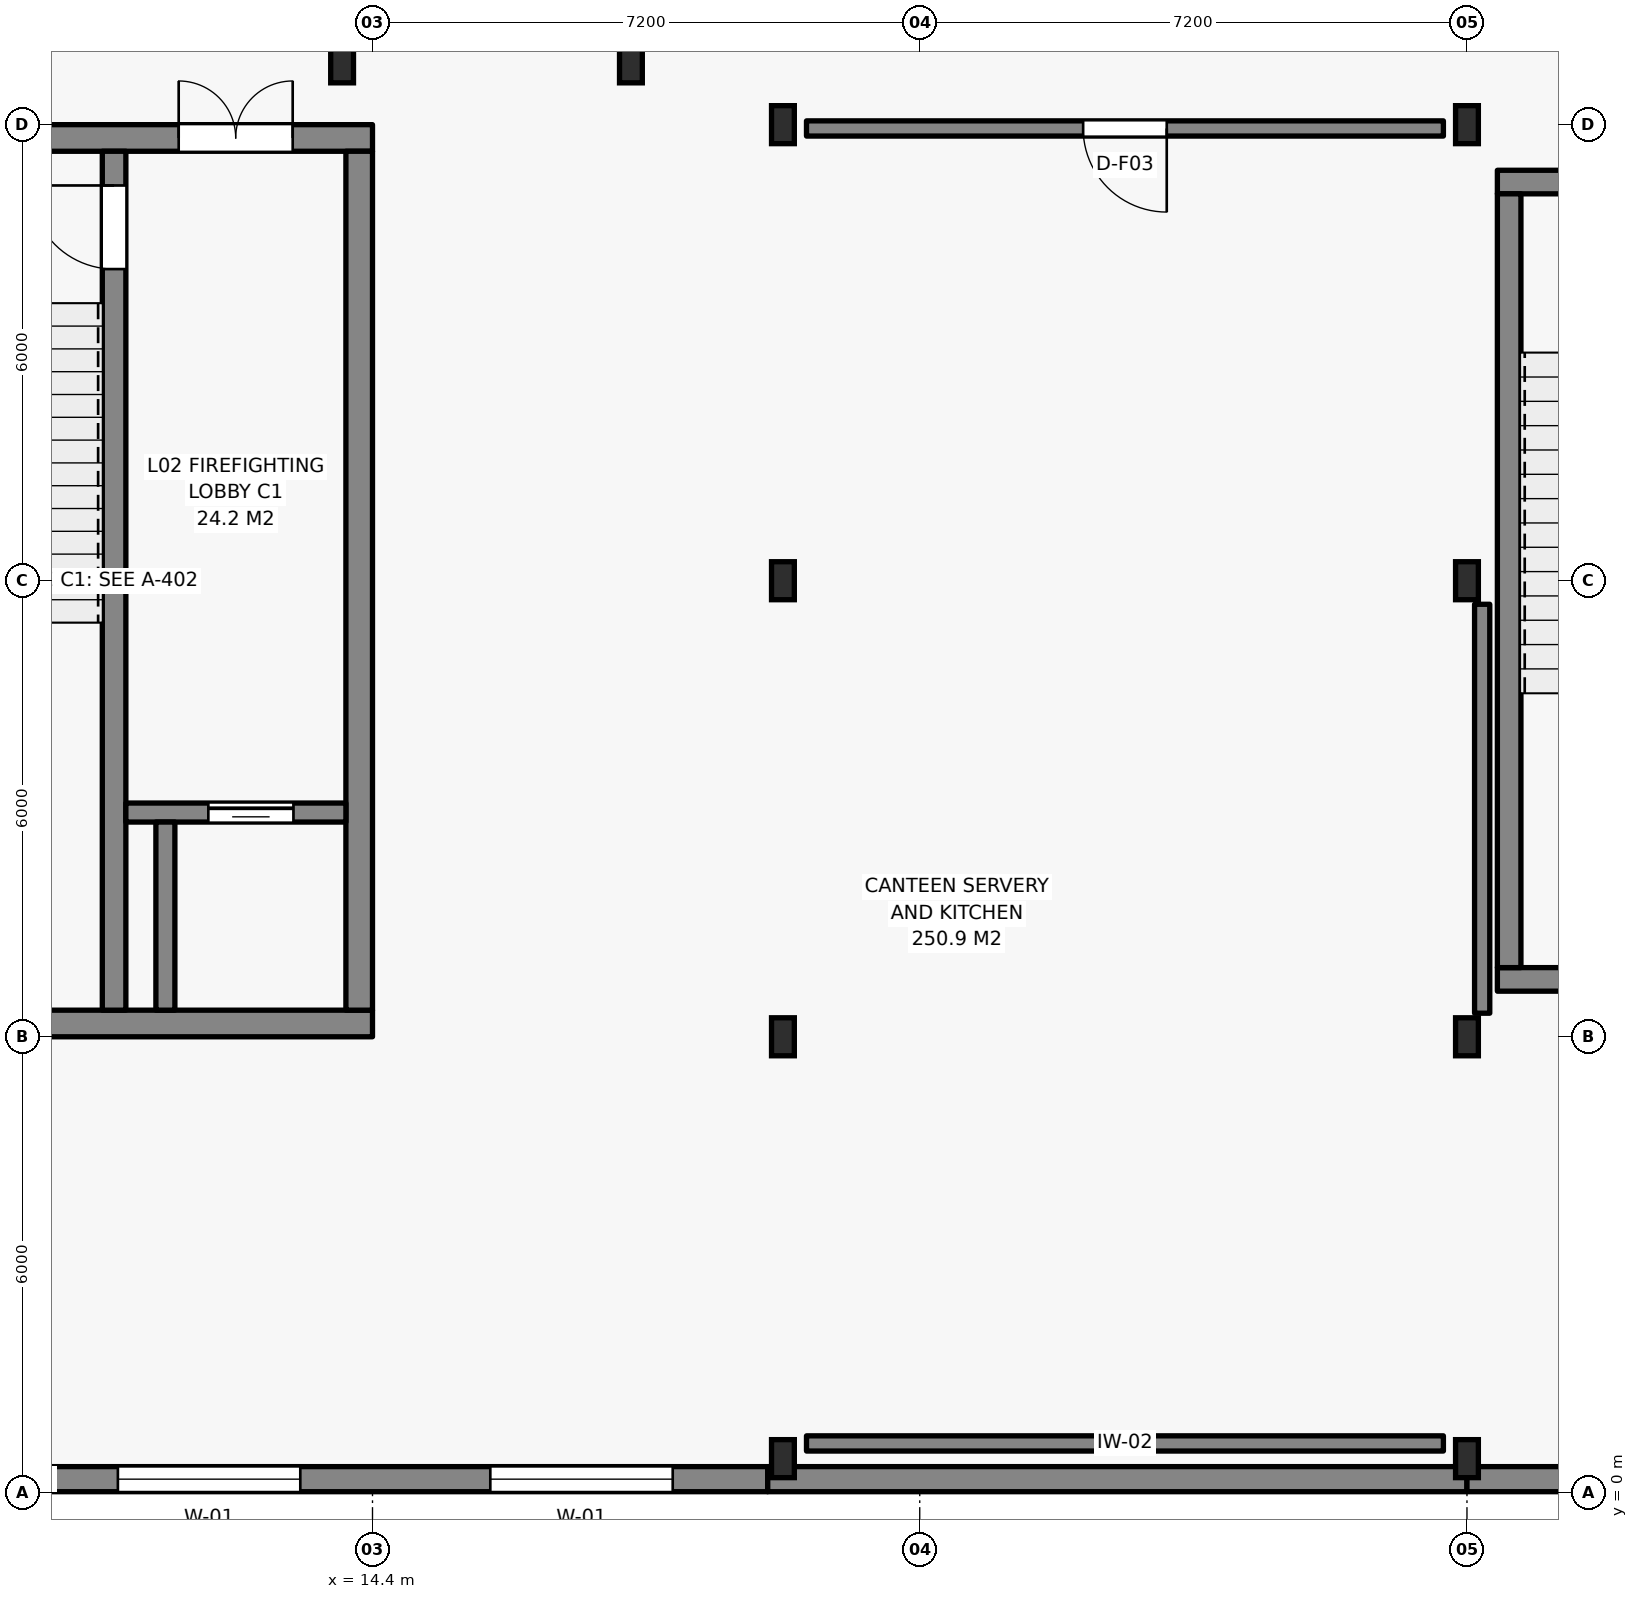
"""IFC4 building model, lengths in metres.
Left out: names, types, materials, properties, quantities, classifications, styles, units other than length and angle.
Written with IfcOpenShell. Run it as: python <this file> out.ifc"""

import sys

from ifc_helpers import new_model, si_unit, direction, frame, frame_2d, origin, origin_2d, place, context, subcontext, project, spatial, rectangle, i_section, extrude, element, fill, save


model = new_model("IFC4")
c1 = context("Model", 3, precision=1e-05, world=origin(), true_north=direction((0.0, 1.0)))
c2 = subcontext(c1, "Body", "Model", "MODEL_VIEW")
j1 = project(units=[si_unit("LENGTHUNIT", "METRE"), si_unit("PLANEANGLEUNIT", "RADIAN")], contexts=[c1])
p1 = place(None, origin())
s1 = spatial("IfcSite", under=j1, at=p1, CompositionType="ELEMENT")
p2 = place(p1, origin())
s2 = spatial("IfcBuilding", under=s1, at=p2, CompositionType="ELEMENT")
p3 = place(p2, frame((0.0, 0.0, 6.0)))
s3 = spatial("IfcBuildingStorey", under=s2, at=p3, CompositionType="ELEMENT", Elevation=6.0)
p4 = place(p3, frame((7.2, 6.175, 0.0), z_axis=(0.0, 0.0, 1.0), x_axis=(1.0, 0.0, 0.0)))
e1 = element("IfcWall", 1, at=p4, inside=s3, PredefinedType="SHEAR", context=c2, shape_type="SweptSolid", body=[
    extrude(rectangle(XDim=7.2, YDim=0.35, at=frame_2d((3.6, 0.0))), origin(), (0.0, 0.0, 1.0), 4.25),
])
p5 = place(p3, frame((7.2, 17.825, 0.0), z_axis=(0.0, 0.0, 1.0), x_axis=(1.0, 0.0, 0.0)))
e2 = element("IfcWall", 2, at=p5, inside=s3, PredefinedType="SHEAR", context=c2, shape_type="SweptSolid", body=[
    extrude(rectangle(XDim=7.2, YDim=0.35, at=frame_2d((3.6, 0.0))), origin(), (0.0, 0.0, 1.0), 4.25),
])
p6 = place(p5, frame((4.65, 0.0, 0.0)))
e3 = element("IfcOpeningElement", 3, at=p6, cuts=e2, PredefinedType="OPENING", context=c2, shape_type="SweptSolid", body=[
    extrude(rectangle(XDim=1.5, YDim=2.15, at=frame_2d((0.75, 1.075))), frame((0.0, 0.185, 0.0), z_axis=(0.0, -1.0, 0.0), x_axis=(1.0, 0.0, 0.0)), (0.0, 0.0, 1.0), 0.37),
])
p7 = place(p3, frame((14.225, 6.35, 0.0), z_axis=(0.0, 0.0, 1.0), x_axis=(0.0, 1.0, 0.0)))
e4 = element("IfcWall", 4, at=p7, inside=s3, PredefinedType="SHEAR", context=c2, shape_type="SweptSolid", body=[
    extrude(rectangle(XDim=11.3, YDim=0.35, at=frame_2d((5.65, 0.0))), origin(), (0.0, 0.0, 1.0), 4.25),
])
p8 = place(p3, frame((11.0, 6.35, 0.0), z_axis=(0.0, 0.0, 1.0), x_axis=(0.0, 1.0, 0.0)))
e5 = element("IfcWall", 5, at=p8, inside=s3, PredefinedType="SHEAR", context=c2, shape_type="SweptSolid", body=[
    extrude(rectangle(XDim=11.3, YDim=0.31, at=frame_2d((5.65, 0.0))), origin(), (0.0, 0.0, 1.0), 4.25),
])
p9 = place(p8, frame((9.75, 0.0, 0.0)))
e6 = element("IfcOpeningElement", 6, at=p9, cuts=e5, PredefinedType="OPENING", context=c2, shape_type="SweptSolid", body=[
    extrude(rectangle(XDim=1.1, YDim=2.15, at=frame_2d((0.55, 1.075))), frame((0.0, 0.165, 0.0), z_axis=(0.0, -1.0, 0.0), x_axis=(1.0, 0.0, 0.0)), (0.0, 0.0, 1.0), 0.33),
])
p10 = place(p3, frame((29.2, 6.755, 0.0), z_axis=(0.0, 0.0, 1.0), x_axis=(1.0, 0.0, 0.0)))
e7 = element("IfcWall", 7, at=p10, inside=s3, PredefinedType="SHEAR", context=c2, shape_type="SweptSolid", body=[
    extrude(rectangle(XDim=4.8, YDim=0.31, at=frame_2d((2.4, 0.0))), origin(), (0.0, 0.0, 1.0), 4.25),
])
p11 = place(p3, frame((29.2, 17.245, 0.0), z_axis=(0.0, 0.0, 1.0), x_axis=(1.0, 0.0, 0.0)))
e8 = element("IfcWall", 8, at=p11, inside=s3, PredefinedType="SHEAR", context=c2, shape_type="SweptSolid", body=[
    extrude(rectangle(XDim=4.8, YDim=0.31, at=frame_2d((2.4, 0.0))), origin(), (0.0, 0.0, 1.0), 4.25),
])
p12 = place(p11, frame((1.5, 0.0, 0.0)))
e9 = element("IfcOpeningElement", 9, at=p12, cuts=e8, PredefinedType="OPENING", context=c2, shape_type="SweptSolid", body=[
    extrude(rectangle(XDim=1.8, YDim=2.15, at=frame_2d((0.9, 1.075))), frame((0.0, 0.165, 0.0), z_axis=(0.0, -1.0, 0.0), x_axis=(1.0, 0.0, 0.0)), (0.0, 0.0, 1.0), 0.33),
])
p13 = place(p3, frame((29.355, 6.91, 0.0), z_axis=(0.0, 0.0, 1.0), x_axis=(0.0, 1.0, 0.0)))
e10 = element("IfcWall", 10, at=p13, inside=s3, PredefinedType="SHEAR", context=c2, shape_type="SweptSolid", body=[
    extrude(rectangle(XDim=10.18, YDim=0.31, at=frame_2d((5.09, 0.0))), origin(), (0.0, 0.0, 1.0), 4.25),
])
for number, where, z_axis, x_axis in (
    (11, (19.8, 0.45, 0.0), (0.0, 0.0, 1.0), (1.0, 0.0, 0.0)),
    (12, (19.8, 6.0, 0.0), (0.0, 0.0, 1.0), (1.0, 0.0, 0.0)),
    (13, (19.8, 12.0, 0.0), (0.0, 0.0, 1.0), (1.0, 0.0, 0.0)),
    (14, (19.8, 18.0, 0.0), (0.0, 0.0, 1.0), (1.0, 0.0, 0.0)),
    (15, (28.8, 0.45, 0.0), (0.0, 0.0, 1.0), (1.0, 0.0, 0.0)),
    (16, (28.8, 6.0, 0.0), (0.0, 0.0, 1.0), (1.0, 0.0, 0.0)),
    (17, (28.8, 12.0, 0.0), (0.0, 0.0, 1.0), (1.0, 0.0, 0.0)),
    (18, (28.8, 18.0, 0.0), (0.0, 0.0, 1.0), (1.0, 0.0, 0.0)),
    (19, (14.0, 18.8, 0.0), (0.0, 0.0, 1.0), (1.0, 0.0, 0.0)),
    (20, (17.8, 18.8, 0.0), (0.0, 0.0, 1.0), (1.0, 0.0, 0.0)),
):
    element("IfcColumn", number, at=place(p3, frame(where, z_axis=z_axis, x_axis=x_axis)), inside=s3, PredefinedType="COLUMN", context=c2, shape_type="SweptSolid", body=[
        extrude(i_section(OverallWidth=0.3, OverallDepth=0.5, WebThickness=0.014, FlangeThickness=0.028, FilletRadius=0.027, at=origin_2d()), origin(), (0.0, 0.0, 1.0), 4.5),
    ])
p14 = place(p3, frame((0.0, 0.18, 0.0), z_axis=(0.0, 0.0, 1.0), x_axis=(1.0, 0.0, 0.0)))
e21 = element("IfcWall", 21, at=p14, inside=s3, PredefinedType="SOLIDWALL", context=c2, shape_type="SweptSolid", body=[
    extrude(rectangle(XDim=19.6, YDim=0.33, at=frame_2d((9.8, 0.0))), origin(), (0.0, 0.0, 1.0), 3.985),
])
p15 = place(p14, frame((1.25, 0.0, 0.82)))
e22 = element("IfcOpeningElement", 22, at=p15, cuts=e21, PredefinedType="OPENING", context=c2, shape_type="SweptSolid", body=[
    extrude(rectangle(XDim=2.4, YDim=2.55, at=frame_2d((1.2, 1.275))), frame((0.0, 0.175, 0.0), z_axis=(0.0, -1.0, 0.0), x_axis=(1.0, 0.0, 0.0)), (0.0, 0.0, 1.0), 0.35),
])
p16 = place(p14, frame((6.15, 0.0, 0.82)))
e23 = element("IfcOpeningElement", 23, at=p16, cuts=e21, PredefinedType="OPENING", context=c2, shape_type="SweptSolid", body=[
    extrude(rectangle(XDim=2.4, YDim=2.55, at=frame_2d((1.2, 1.275))), frame((0.0, 0.175, 0.0), z_axis=(0.0, -1.0, 0.0), x_axis=(1.0, 0.0, 0.0)), (0.0, 0.0, 1.0), 0.35),
])
p17 = place(p14, frame((11.05, 0.0, 0.82)))
e24 = element("IfcOpeningElement", 24, at=p17, cuts=e21, PredefinedType="OPENING", context=c2, shape_type="SweptSolid", body=[
    extrude(rectangle(XDim=2.4, YDim=2.55, at=frame_2d((1.2, 1.275))), frame((0.0, 0.175, 0.0), z_axis=(0.0, -1.0, 0.0), x_axis=(1.0, 0.0, 0.0)), (0.0, 0.0, 1.0), 0.35),
])
p18 = place(p14, frame((15.95, 0.0, 0.82)))
e25 = element("IfcOpeningElement", 25, at=p18, cuts=e21, PredefinedType="OPENING", context=c2, shape_type="SweptSolid", body=[
    extrude(rectangle(XDim=2.4, YDim=2.55, at=frame_2d((1.2, 1.275))), frame((0.0, 0.175, 0.0), z_axis=(0.0, -1.0, 0.0), x_axis=(1.0, 0.0, 0.0)), (0.0, 0.0, 1.0), 0.35),
])
p19 = place(p3, frame((19.6, 0.18, 0.0), z_axis=(0.0, 0.0, 1.0), x_axis=(1.0, 0.0, 0.0)))
e26 = element("IfcWall", 26, at=p19, inside=s3, PredefinedType="SOLIDWALL", context=c2, shape_type="SweptSolid", body=[
    extrude(rectangle(XDim=9.2, YDim=0.33, at=frame_2d((4.6, 0.0))), origin(), (0.0, 0.0, 1.0), 3.695),
])
p20 = place(p3, frame((28.8, 0.18, 0.0), z_axis=(0.0, 0.0, 1.0), x_axis=(1.0, 0.0, 0.0)))
e27 = element("IfcWall", 27, at=p20, inside=s3, PredefinedType="SOLIDWALL", context=c2, shape_type="SweptSolid", body=[
    extrude(rectangle(XDim=7.2, YDim=0.33, at=frame_2d((3.6, 0.0))), origin(), (0.0, 0.0, 1.0), 4.25),
])
p21 = place(p20, frame((2.4, 0.0, 0.82)))
e28 = element("IfcOpeningElement", 28, at=p21, cuts=e27, PredefinedType="OPENING", context=c2, shape_type="SweptSolid", body=[
    extrude(rectangle(XDim=2.4, YDim=2.55, at=frame_2d((1.2, 1.275))), frame((0.0, 0.175, 0.0), z_axis=(0.0, -1.0, 0.0), x_axis=(1.0, 0.0, 0.0)), (0.0, 0.0, 1.0), 0.35),
])
p22 = place(p3, frame((11.155, 8.95, 0.0), z_axis=(0.0, 0.0, 1.0), x_axis=(1.0, 0.0, 0.0)))
e29 = element("IfcWall", 29, at=p22, inside=s3, PredefinedType="SHEAR", context=c2, shape_type="SweptSolid", body=[
    extrude(rectangle(XDim=2.895, YDim=0.25, at=frame_2d((1.448, 0.0))), origin(), (0.0, 0.0, 1.0), 4.25),
])
p23 = place(p22, frame((1.085, 0.0, 0.0)))
e30 = element("IfcOpeningElement", 30, at=p23, cuts=e29, PredefinedType="OPENING", context=c2, shape_type="SweptSolid", body=[
    extrude(rectangle(XDim=1.12, YDim=2.15, at=frame_2d((0.56, 1.075))), frame((0.0, 0.135, 0.0), z_axis=(0.0, -1.0, 0.0), x_axis=(1.0, 0.0, 0.0)), (0.0, 0.0, 1.0), 0.27),
])
p24 = place(p3, frame((11.675, 6.35, 0.0), z_axis=(0.0, 0.0, 1.0), x_axis=(0.0, 1.0, 0.0)))
e31 = element("IfcWall", 31, at=p24, inside=s3, PredefinedType="SHEAR", context=c2, shape_type="SweptSolid", body=[
    extrude(rectangle(XDim=2.475, YDim=0.25, at=frame_2d((1.237, 0.0))), origin(), (0.0, 0.0, 1.0), 4.25),
])
p25 = place(p3, frame((20.11, 0.65, 0.0), z_axis=(0.0, 0.0, 1.0), x_axis=(1.0, 0.0, 0.0)))
e32 = element("IfcWall", 32, at=p25, inside=s3, PredefinedType="PARTITIONING", context=c2, shape_type="SweptSolid", body=[
    extrude(rectangle(XDim=8.38, YDim=0.2, at=frame_2d((4.19, 0.0))), origin(), (0.0, 0.0, 1.0), 3.695),
])
p26 = place(p3, frame((29.0, 6.31, 0.0), z_axis=(0.0, 0.0, 1.0), x_axis=(0.0, 1.0, 0.0)))
e33 = element("IfcWall", 33, at=p26, inside=s3, PredefinedType="PARTITIONING", context=c2, shape_type="SweptSolid", body=[
    extrude(rectangle(XDim=5.38, YDim=0.2, at=frame_2d((2.69, 0.0))), origin(), (0.0, 0.0, 1.0), 3.845),
])
p27 = place(p3, frame((28.49, 17.95, 0.0), z_axis=(0.0, 0.0, 1.0), x_axis=(-1.0, 0.0, 0.0)))
e34 = element("IfcWall", 34, at=p27, inside=s3, PredefinedType="PARTITIONING", context=c2, shape_type="SweptSolid", body=[
    extrude(rectangle(XDim=8.38, YDim=0.2, at=frame_2d((4.19, 0.0))), origin(), (0.0, 0.0, 1.0), 3.695),
])
p28 = place(p27, frame((3.64, 0.0, 0.0)))
e35 = element("IfcOpeningElement", 35, at=p28, cuts=e34, PredefinedType="OPENING", context=c2, shape_type="SweptSolid", body=[
    extrude(rectangle(XDim=1.1, YDim=2.15, at=frame_2d((0.55, 1.075))), frame((0.0, 0.11, 0.0), z_axis=(0.0, -1.0, 0.0), x_axis=(1.0, 0.0, 0.0)), (0.0, 0.0, 1.0), 0.22),
])
p29 = place(p17, origin())
e36 = element("IfcWindow", 36, at=p29, inside=s3, PartitioningType="SINGLE_PANEL", PredefinedType="WINDOW", context=c2, shape_type="SweptSolid", body=[
    extrude(rectangle(XDim=2.4, YDim=2.55, at=frame_2d((1.2, 1.275))), frame((0.0, 0.03, 0.0), z_axis=(0.0, -1.0, 0.0), x_axis=(1.0, 0.0, 0.0)), (0.0, 0.0, 1.0), 0.06),
])
fill(e24, e36)
p30 = place(p18, origin())
e37 = element("IfcWindow", 37, at=p30, inside=s3, PartitioningType="SINGLE_PANEL", PredefinedType="WINDOW", context=c2, shape_type="SweptSolid", body=[
    extrude(rectangle(XDim=2.4, YDim=2.55, at=frame_2d((1.2, 1.275))), frame((0.0, 0.03, 0.0), z_axis=(0.0, -1.0, 0.0), x_axis=(1.0, 0.0, 0.0)), (0.0, 0.0, 1.0), 0.06),
])
fill(e25, e37)
p31 = place(p23, origin())
e38 = element("IfcDoor", 38, at=p31, inside=s3, OperationType="SLIDING_TO_LEFT", PredefinedType="DOOR", context=c2, shape_type="SweptSolid", body=[
    extrude(rectangle(XDim=1.12, YDim=2.15, at=frame_2d((0.56, 1.075))), frame((0.0, 0.025, 0.0), z_axis=(0.0, -1.0, 0.0), x_axis=(1.0, 0.0, 0.0)), (0.0, 0.0, 1.0), 0.05),
])
fill(e30, e38)
p32 = place(p6, origin())
e39 = element("IfcDoor", 39, at=p32, inside=s3, OperationType="DOUBLE_DOOR_SINGLE_SWING", PredefinedType="DOOR", context=c2, shape_type="SweptSolid", body=[
    extrude(rectangle(XDim=1.5, YDim=2.15, at=frame_2d((0.75, 1.075))), frame((0.0, 0.025, 0.0), z_axis=(0.0, -1.0, 0.0), x_axis=(1.0, 0.0, 0.0)), (0.0, 0.0, 1.0), 0.05),
])
fill(e3, e39)
p33 = place(p9, origin())
e40 = element("IfcDoor", 40, at=p33, inside=s3, OperationType="SINGLE_SWING_RIGHT", PredefinedType="DOOR", context=c2, shape_type="SweptSolid", body=[
    extrude(rectangle(XDim=1.1, YDim=2.15, at=frame_2d((0.55, 1.075))), frame((0.0, 0.025, 0.0), z_axis=(0.0, -1.0, 0.0), x_axis=(1.0, 0.0, 0.0)), (0.0, 0.0, 1.0), 0.05),
])
fill(e6, e40)
p34 = place(p28, origin())
e41 = element("IfcDoor", 41, at=p34, inside=s3, OperationType="SINGLE_SWING_LEFT", PredefinedType="DOOR", context=c2, shape_type="SweptSolid", body=[
    extrude(rectangle(XDim=1.1, YDim=2.15, at=frame_2d((0.55, 1.075))), frame((0.0, 0.025, 0.0), z_axis=(0.0, -1.0, 0.0), x_axis=(1.0, 0.0, 0.0)), (0.0, 0.0, 1.0), 0.05),
])
fill(e35, e41)
save(model, sys.argv[1])
